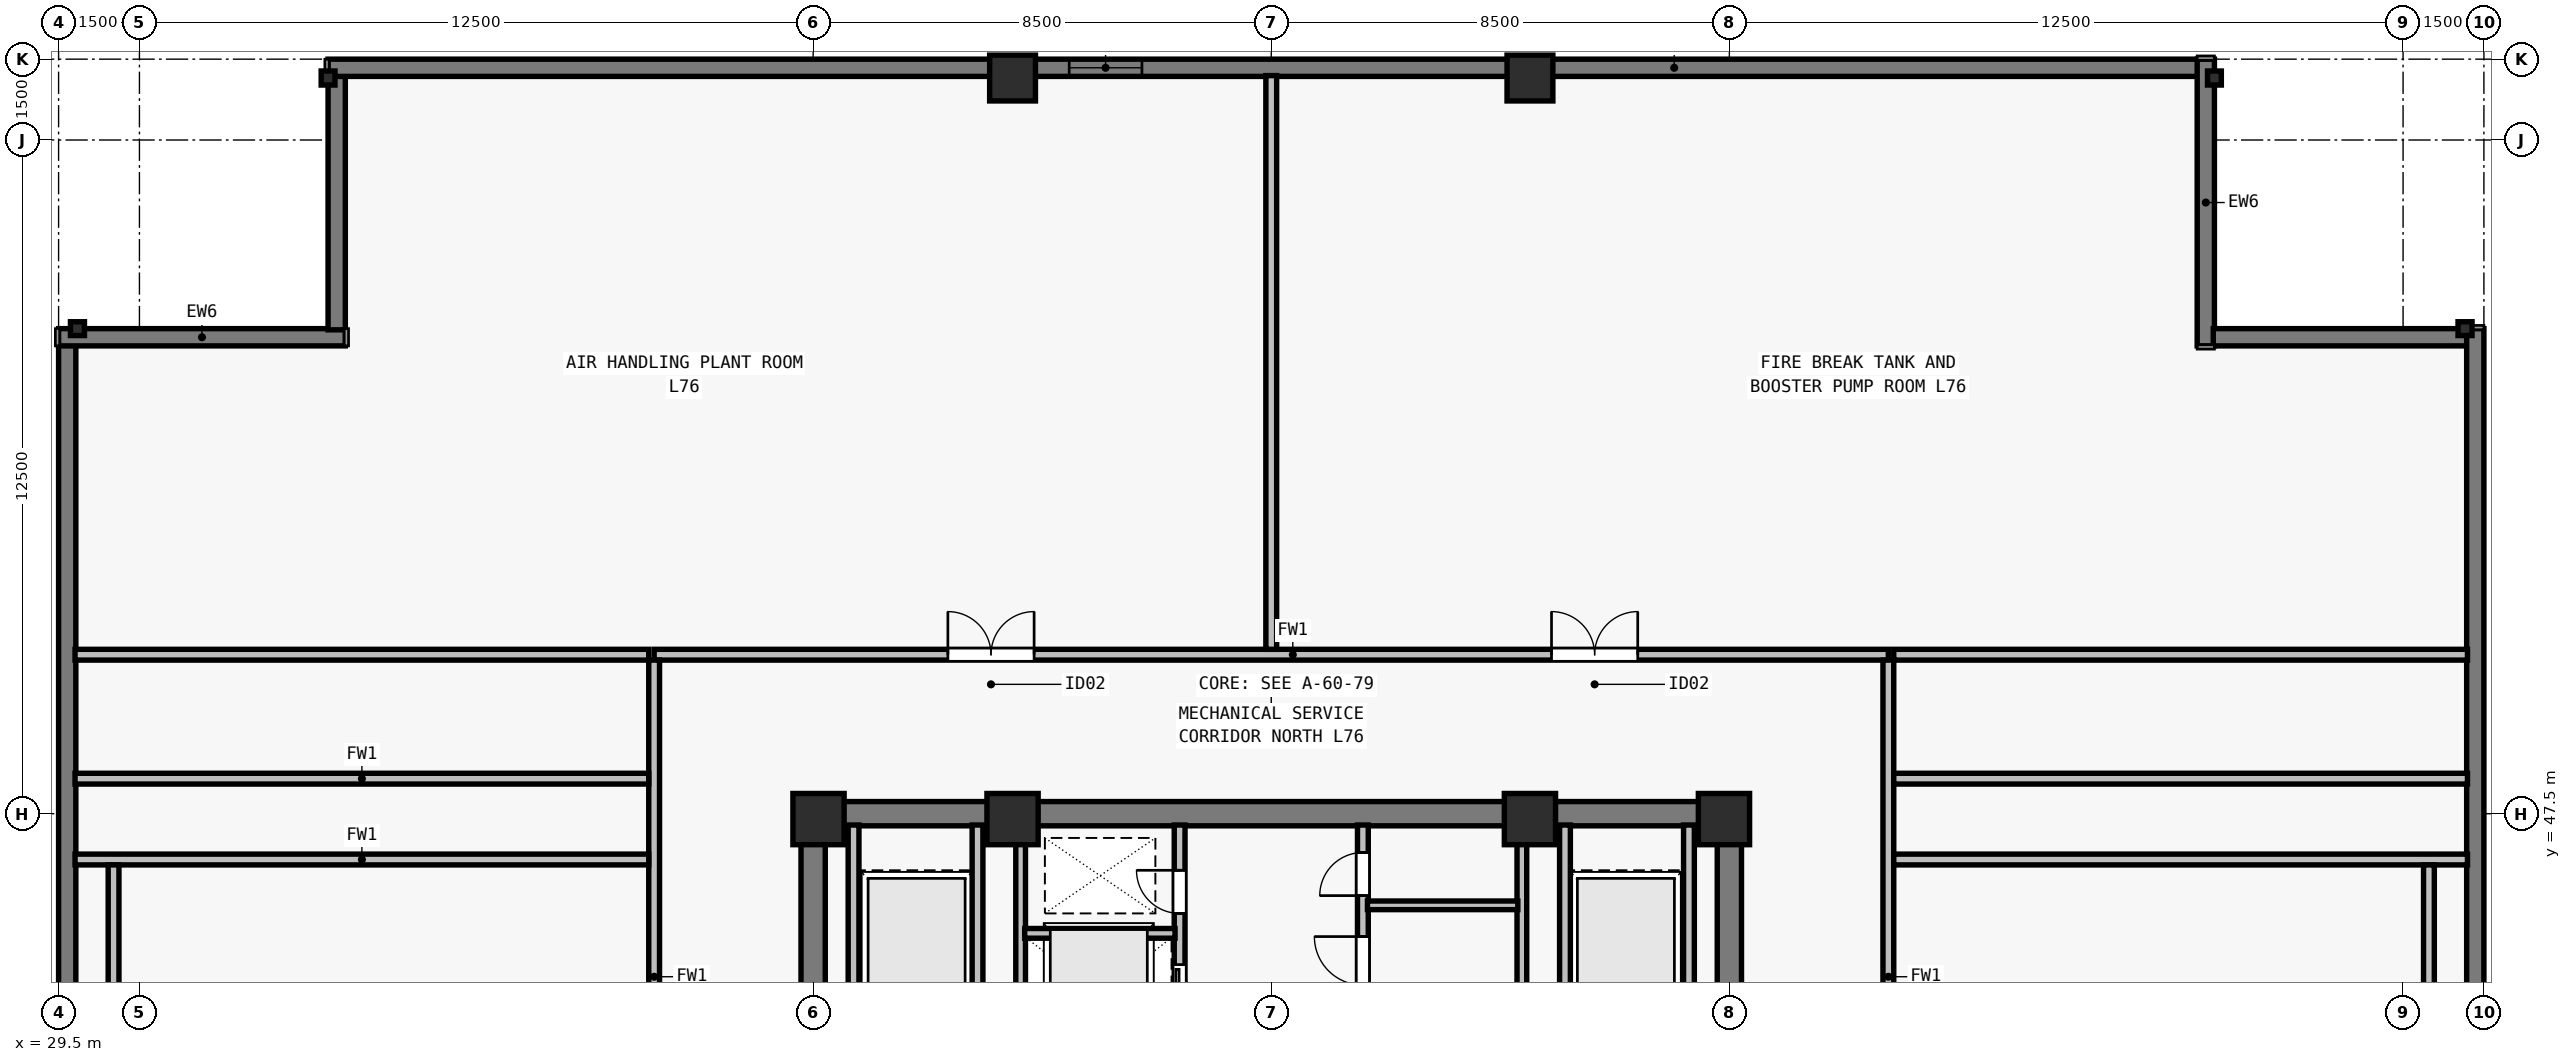
"""IFC4 building model, lengths in metres.
Left out: names, types, materials, properties, quantities, classifications, styles, units other than length and angle.
Written with IfcOpenShell. Run it as: python <this file> out.ifc"""

import sys

from ifc_helpers import new_model, si_unit, direction, frame, frame_2d, origin, origin_2d, place, context, subcontext, project, spatial, rectangle, i_section, extrude, element, fill, save


model = new_model("IFC4")
c1 = context("Model", 3, precision=1e-05, world=origin(), true_north=direction((0.0, 1.0)))
c2 = subcontext(c1, "Body", "Model", "MODEL_VIEW")
j1 = project(units=[si_unit("LENGTHUNIT", "METRE"), si_unit("PLANEANGLEUNIT", "RADIAN")], contexts=[c1])
p1 = place(None, origin())
s1 = spatial("IfcSite", under=j1, at=p1, CompositionType="ELEMENT")
p2 = place(p1, origin())
s2 = spatial("IfcBuilding", under=s1, at=p2, CompositionType="ELEMENT")
p3 = place(p2, frame((0.0, 0.0, 276.0)))
s3 = spatial("IfcBuildingStorey", under=s2, at=p3, CompositionType="ELEMENT", Elevation=276.0)
for number, where, z_axis, x_axis in (
    (1, (43.6, 47.4, 0.0), (0.0, 0.0, 1.0), (1.0, 0.0, 0.0)),
    (2, (47.2, 47.4, 0.0), (0.0, 0.0, 1.0), (1.0, 0.0, 0.0)),
    (3, (56.8, 47.4, 0.0), (0.0, 0.0, 1.0), (1.0, 0.0, 0.0)),
    (4, (60.4, 47.4, 0.0), (0.0, 0.0, 1.0), (1.0, 0.0, 0.0)),
):
    element("IfcColumn", number, at=place(p3, frame(where, z_axis=z_axis, x_axis=x_axis)), inside=s3, PredefinedType="COLUMN", context=c2, shape_type="SweptSolid", body=[
        extrude(rectangle(XDim=0.95, YDim=0.95, at=origin_2d()), origin(), (0.0, 0.0, 1.0), 4.5),
    ])
for number, where, z_axis, x_axis in (
    (5, (74.15, 56.5, 0.0), (0.0, 0.0, 1.0), (0.0, 1.0, 0.0)),
    (6, (69.5, 61.15, 0.0), (0.0, 0.0, 1.0), (1.0, 0.0, 0.0)),
):
    element("IfcColumn", number, at=place(p3, frame(where, z_axis=z_axis, x_axis=x_axis)), inside=s3, PredefinedType="COLUMN", context=c2, shape_type="SweptSolid", body=[
        extrude(i_section(OverallWidth=0.256, OverallDepth=0.26, WebThickness=0.01, FlangeThickness=0.017, FilletRadius=0.013, at=origin_2d()), origin(), (0.0, 0.0, 1.0), 4.5),
    ])
for number, where, z_axis, x_axis in (
    (7, (56.8, 61.15, 0.0), (0.0, 0.0, 1.0), (1.0, 0.0, 0.0)),
    (8, (47.2, 61.15, 0.0), (0.0, 0.0, 1.0), (1.0, 0.0, 0.0)),
):
    element("IfcColumn", number, at=place(p3, frame(where, z_axis=z_axis, x_axis=x_axis)), inside=s3, PredefinedType="COLUMN", context=c2, shape_type="SweptSolid", body=[
        extrude(rectangle(XDim=0.85, YDim=0.85, at=origin_2d()), origin(), (0.0, 0.0, 1.0), 4.5),
    ])
for number, where, z_axis, x_axis in (
    (9, (34.5, 61.15, 0.0), (0.0, 0.0, 1.0), (1.0, 0.0, 0.0)),
    (10, (29.85, 56.5, 0.0), (0.0, 0.0, 1.0), (0.0, 1.0, 0.0)),
):
    element("IfcColumn", number, at=place(p3, frame(where, z_axis=z_axis, x_axis=x_axis)), inside=s3, PredefinedType="COLUMN", context=c2, shape_type="SweptSolid", body=[
        extrude(i_section(OverallWidth=0.256, OverallDepth=0.26, WebThickness=0.01, FlangeThickness=0.017, FilletRadius=0.013, at=origin_2d()), origin(), (0.0, 0.0, 1.0), 4.5),
    ])
p4 = place(p3, frame((29.66, 21.5, 0.0), z_axis=(0.0, 0.0, 1.0), x_axis=(0.0, 1.0, 0.0)))
e11 = element("IfcWall", 11, at=p4, inside=s3, PredefinedType="SOLIDWALL", context=c2, shape_type="SweptSolid", body=[
    extrude(rectangle(XDim=34.702, YDim=0.32, at=frame_2d((17.351, 0.0))), origin(), (0.0, 0.0, 1.0), 4.29),
])
p5 = place(p3, frame((29.5, 56.34, 0.0), z_axis=(0.0, 0.0, 1.0), x_axis=(1.0, 0.0, 0.0)))
e12 = element("IfcWall", 12, at=p5, inside=s3, PredefinedType="SOLIDWALL", context=c2, shape_type="SweptSolid", body=[
    extrude(rectangle(XDim=5.32, YDim=0.32, at=frame_2d((2.66, 0.0))), origin(), (0.0, 0.0, 1.0), 4.29),
])
p6 = place(p3, frame((34.66, 56.478, 0.0), z_axis=(0.0, 0.0, 1.0), x_axis=(0.0, 1.0, 0.0)))
e13 = element("IfcWall", 13, at=p6, inside=s3, PredefinedType="SOLIDWALL", context=c2, shape_type="SweptSolid", body=[
    extrude(rectangle(XDim=4.724, YDim=0.32, at=frame_2d((2.362, 0.0))), origin(), (0.0, 0.0, 1.0), 4.29),
])
p7 = place(p3, frame((34.5, 61.34, 0.0), z_axis=(0.0, 0.0, 1.0), x_axis=(1.0, 0.0, 0.0)))
e14 = element("IfcWall", 14, at=p7, inside=s3, PredefinedType="SOLIDWALL", context=c2, shape_type="SweptSolid", body=[
    extrude(rectangle(XDim=34.702, YDim=0.32, at=frame_2d((17.351, 0.0))), origin(), (0.0, 0.0, 1.0), 4.29),
])
p8 = place(p7, frame((13.751, 0.0, 0.8)))
e15 = element("IfcOpeningElement", 15, at=p8, cuts=e14, PredefinedType="OPENING", context=c2, shape_type="SweptSolid", body=[
    extrude(rectangle(XDim=1.35, YDim=1.54, at=frame_2d((0.675, 0.77))), frame((0.0, 0.17, 0.0), z_axis=(0.0, -1.0, 0.0), x_axis=(1.0, 0.0, 0.0)), (0.0, 0.0, 1.0), 0.34),
])
p9 = place(p3, frame((69.34, 61.5, 0.0), z_axis=(0.0, 0.0, 1.0), x_axis=(0.0, -1.0, 0.0)))
e16 = element("IfcWall", 16, at=p9, inside=s3, PredefinedType="SOLIDWALL", context=c2, shape_type="SweptSolid", body=[
    extrude(rectangle(XDim=5.32, YDim=0.32, at=frame_2d((2.66, 0.0))), origin(), (0.0, 0.0, 1.0), 4.29),
])
p10 = place(p3, frame((69.478, 56.34, 0.0), z_axis=(0.0, 0.0, 1.0), x_axis=(1.0, 0.0, 0.0)))
e17 = element("IfcWall", 17, at=p10, inside=s3, PredefinedType="SOLIDWALL", context=c2, shape_type="SweptSolid", body=[
    extrude(rectangle(XDim=4.724, YDim=0.32, at=frame_2d((2.362, 0.0))), origin(), (0.0, 0.0, 1.0), 4.29),
])
p11 = place(p3, frame((74.34, 56.5, 0.0), z_axis=(0.0, 0.0, 1.0), x_axis=(0.0, -1.0, 0.0)))
e18 = element("IfcWall", 18, at=p11, inside=s3, PredefinedType="SOLIDWALL", context=c2, shape_type="SweptSolid", body=[
    extrude(rectangle(XDim=34.702, YDim=0.32, at=frame_2d((17.351, 0.0))), origin(), (0.0, 0.0, 1.0), 4.29),
])
p12 = place(p3, frame((43.275, 47.5, 0.0), z_axis=(0.0, 0.0, 1.0), x_axis=(1.0, 0.0, 0.0)))
e19 = element("IfcWall", 19, at=p12, inside=s3, PredefinedType="SHEAR", context=c2, shape_type="SweptSolid", body=[
    extrude(rectangle(XDim=17.45, YDim=0.45, at=frame_2d((8.725, 0.0))), origin(), (0.0, 0.0, 1.0), 4.29),
])
for number, where, z_axis, x_axis in (
    (20, (43.5, 40.8, 0.0), (0.0, 0.0, 1.0), (0.0, 1.0, 0.0)),
    (21, (60.5, 40.8, 0.0), (0.0, 0.0, 1.0), (0.0, 1.0, 0.0)),
):
    element("IfcWall", number, at=place(p3, frame(where, z_axis=z_axis, x_axis=x_axis)), inside=s3, PredefinedType="SHEAR", context=c2, shape_type="SweptSolid", body=[
        extrude(rectangle(XDim=6.485, YDim=0.45, at=frame_2d((3.242, 0.0))), origin(), (0.0, 0.0, 1.0), 4.29),
    ])
p13 = place(p3, frame((50.3, 40.585, 0.0), z_axis=(0.0, 0.0, 1.0), x_axis=(0.0, 1.0, 0.0)))
e22 = element("IfcWall", 22, at=p13, inside=s3, PredefinedType="SOLIDWALL", context=c2, shape_type="SweptSolid", body=[
    extrude(rectangle(XDim=6.705, YDim=0.2, at=frame_2d((3.353, 0.0))), origin(), (0.0, 0.0, 1.0), 4.29),
])
p14 = place(p13, frame((0.515, 0.0, 0.0)))
e23 = element("IfcOpeningElement", 23, at=p14, cuts=e22, PredefinedType="OPENING", context=c2, shape_type="SweptSolid", body=[
    extrude(rectangle(XDim=1.1, YDim=2.2, at=frame_2d((0.55, 1.1))), frame((0.0, 0.11, 0.0), z_axis=(0.0, -1.0, 0.0), x_axis=(1.0, 0.0, 0.0)), (0.0, 0.0, 1.0), 0.22),
])
p15 = place(p13, frame((3.015, 0.0, 0.0)))
e24 = element("IfcOpeningElement", 24, at=p15, cuts=e22, PredefinedType="OPENING", context=c2, shape_type="SweptSolid", body=[
    extrude(rectangle(XDim=1.1, YDim=2.2, at=frame_2d((0.55, 1.1))), frame((0.0, 0.11, 0.0), z_axis=(0.0, -1.0, 0.0), x_axis=(1.0, 0.0, 0.0)), (0.0, 0.0, 1.0), 0.22),
])
p16 = place(p13, frame((5.065, 0.0, 0.0)))
e25 = element("IfcOpeningElement", 25, at=p16, cuts=e22, PredefinedType="OPENING", context=c2, shape_type="SweptSolid", body=[
    extrude(rectangle(XDim=0.8, YDim=2.08, at=frame_2d((0.4, 1.04))), frame((0.0, 0.11, 0.0), z_axis=(0.0, -1.0, 0.0), x_axis=(1.0, 0.0, 0.0)), (0.0, 0.0, 1.0), 0.22),
])
p17 = place(p3, frame((53.7, 40.585, 0.0), z_axis=(0.0, 0.0, 1.0), x_axis=(0.0, 1.0, 0.0)))
e26 = element("IfcWall", 26, at=p17, inside=s3, PredefinedType="SOLIDWALL", context=c2, shape_type="SweptSolid", body=[
    extrude(rectangle(XDim=6.705, YDim=0.2, at=frame_2d((3.353, 0.0))), origin(), (0.0, 0.0, 1.0), 4.29),
])
p18 = place(p17, frame((0.195, 0.0, 0.0)))
e27 = element("IfcOpeningElement", 27, at=p18, cuts=e26, PredefinedType="OPENING", context=c2, shape_type="SweptSolid", body=[
    extrude(rectangle(XDim=0.8, YDim=2.08, at=frame_2d((0.4, 1.04))), frame((0.0, 0.11, 0.0), z_axis=(0.0, -1.0, 0.0), x_axis=(1.0, 0.0, 0.0)), (0.0, 0.0, 1.0), 0.22),
])
p19 = place(p17, frame((3.735, 0.0, 0.0)))
e28 = element("IfcOpeningElement", 28, at=p19, cuts=e26, PredefinedType="OPENING", context=c2, shape_type="SweptSolid", body=[
    extrude(rectangle(XDim=0.9, YDim=2.12, at=frame_2d((0.45, 1.06))), frame((0.0, 0.11, 0.0), z_axis=(0.0, -1.0, 0.0), x_axis=(1.0, 0.0, 0.0)), (0.0, 0.0, 1.0), 0.22),
])
p20 = place(p17, frame((5.395, 0.0, 0.0)))
e29 = element("IfcOpeningElement", 29, at=p20, cuts=e26, PredefinedType="OPENING", context=c2, shape_type="SweptSolid", body=[
    extrude(rectangle(XDim=0.8, YDim=2.1, at=frame_2d((0.4, 1.05))), frame((0.0, 0.11, 0.0), z_axis=(0.0, -1.0, 0.0), x_axis=(1.0, 0.0, 0.0)), (0.0, 0.0, 1.0), 0.22),
])
for number, where, z_axis, x_axis in (
    (30, (46.55, 43.735, 0.0), (0.0, 0.0, 1.0), (0.0, 1.0, 0.0)),
    (31, (44.25, 43.735, 0.0), (0.0, 0.0, 1.0), (0.0, 1.0, 0.0)),
    (32, (57.45, 43.735, 0.0), (0.0, 0.0, 1.0), (0.0, 1.0, 0.0)),
    (33, (59.75, 43.735, 0.0), (0.0, 0.0, 1.0), (0.0, 1.0, 0.0)),
):
    element("IfcWall", number, at=place(p3, frame(where, z_axis=z_axis, x_axis=x_axis)), inside=s3, PredefinedType="SOLIDWALL", context=c2, shape_type="SweptSolid", body=[
        extrude(rectangle(XDim=3.555, YDim=0.2, at=frame_2d((1.777, 0.0))), origin(), (0.0, 0.0, 1.0), 4.29),
    ])
p21 = place(p3, frame((47.35, 43.735, 0.0), z_axis=(0.0, 0.0, 1.0), x_axis=(0.0, 1.0, 0.0)))
e34 = element("IfcWall", 34, at=p21, inside=s3, PredefinedType="SOLIDWALL", context=c2, shape_type="SweptSolid", body=[
    extrude(rectangle(XDim=3.555, YDim=0.18, at=frame_2d((1.777, 0.0))), origin(), (0.0, 0.0, 1.0), 4.29),
])
p22 = place(p3, frame((47.425, 45.28, 0.0), z_axis=(0.0, 0.0, 1.0), x_axis=(1.0, 0.0, 0.0)))
e35 = element("IfcWall", 35, at=p22, inside=s3, PredefinedType="SOLIDWALL", context=c2, shape_type="SweptSolid", body=[
    extrude(rectangle(XDim=2.79, YDim=0.18, at=frame_2d((1.395, 0.0))), origin(), (0.0, 0.0, 1.0), 4.29),
])
p23 = place(p3, frame((56.65, 43.735, 0.0), z_axis=(0.0, 0.0, 1.0), x_axis=(0.0, 1.0, 0.0)))
e36 = element("IfcWall", 36, at=p23, inside=s3, PredefinedType="SOLIDWALL", context=c2, shape_type="SweptSolid", body=[
    extrude(rectangle(XDim=3.555, YDim=0.18, at=frame_2d((1.777, 0.0))), origin(), (0.0, 0.0, 1.0), 4.29),
])
p24 = place(p3, frame((53.785, 45.8, 0.0), z_axis=(0.0, 0.0, 1.0), x_axis=(1.0, 0.0, 0.0)))
e37 = element("IfcWall", 37, at=p24, inside=s3, PredefinedType="PARTITIONING", context=c2, shape_type="SweptSolid", body=[
    extrude(rectangle(XDim=2.79, YDim=0.16, at=frame_2d((1.395, 0.0))), origin(), (0.0, 0.0, 1.0), 4.29),
])
p25 = place(p3, frame((40.55, 50.45, 0.0), z_axis=(0.0, 0.0, 1.0), x_axis=(1.0, 0.0, 0.0)))
e38 = element("IfcWall", 38, at=p25, inside=s3, PredefinedType="SOLIDWALL", context=c2, shape_type="SweptSolid", body=[
    extrude(rectangle(XDim=22.9, YDim=0.2, at=frame_2d((11.45, 0.0))), origin(), (0.0, 0.0, 1.0), 4.29),
])
p26 = place(p25, frame((5.45, 0.0, 0.0)))
e39 = element("IfcOpeningElement", 39, at=p26, cuts=e38, PredefinedType="OPENING", context=c2, shape_type="SweptSolid", body=[
    extrude(rectangle(XDim=1.6, YDim=2.2, at=frame_2d((0.8, 1.1))), frame((0.0, 0.11, 0.0), z_axis=(0.0, -1.0, 0.0), x_axis=(1.0, 0.0, 0.0)), (0.0, 0.0, 1.0), 0.22),
])
p27 = place(p25, frame((16.65, 0.0, 0.0)))
e40 = element("IfcOpeningElement", 40, at=p27, cuts=e38, PredefinedType="OPENING", context=c2, shape_type="SweptSolid", body=[
    extrude(rectangle(XDim=1.6, YDim=2.2, at=frame_2d((0.8, 1.1))), frame((0.0, 0.11, 0.0), z_axis=(0.0, -1.0, 0.0), x_axis=(1.0, 0.0, 0.0)), (0.0, 0.0, 1.0), 0.22),
])
p28 = place(p3, frame((40.55, 27.65, 0.0), z_axis=(0.0, 0.0, 1.0), x_axis=(0.0, 1.0, 0.0)))
e41 = element("IfcWall", 41, at=p28, inside=s3, PredefinedType="SOLIDWALL", context=c2, shape_type="SweptSolid", body=[
    extrude(rectangle(XDim=22.7, YDim=0.2, at=frame_2d((11.35, 0.0))), origin(), (0.0, 0.0, 1.0), 4.29),
])
p29 = place(p28, frame((9.2, 0.0, 0.0)))
e42 = element("IfcOpeningElement", 42, at=p29, cuts=e41, PredefinedType="OPENING", context=c2, shape_type="SweptSolid", body=[
    extrude(rectangle(XDim=1.6, YDim=2.2, at=frame_2d((0.8, 1.1))), frame((0.0, 0.11, 0.0), z_axis=(0.0, -1.0, 0.0), x_axis=(1.0, 0.0, 0.0)), (0.0, 0.0, 1.0), 0.22),
])
p30 = place(p3, frame((63.45, 27.65, 0.0), z_axis=(0.0, 0.0, 1.0), x_axis=(0.0, 1.0, 0.0)))
e43 = element("IfcWall", 43, at=p30, inside=s3, PredefinedType="SOLIDWALL", context=c2, shape_type="SweptSolid", body=[
    extrude(rectangle(XDim=22.7, YDim=0.2, at=frame_2d((11.35, 0.0))), origin(), (0.0, 0.0, 1.0), 4.29),
])
p31 = place(p30, frame((9.2, 0.0, 0.0)))
e44 = element("IfcOpeningElement", 44, at=p31, cuts=e43, PredefinedType="OPENING", context=c2, shape_type="SweptSolid", body=[
    extrude(rectangle(XDim=1.6, YDim=2.2, at=frame_2d((0.8, 1.1))), frame((0.0, 0.11, 0.0), z_axis=(0.0, -1.0, 0.0), x_axis=(1.0, 0.0, 0.0)), (0.0, 0.0, 1.0), 0.22),
])
for number, where, z_axis, x_axis in (
    (45, (29.805, 46.65, 0.0), (0.0, 0.0, 1.0), (1.0, 0.0, 0.0)),
    (46, (63.55, 46.65, 0.0), (0.0, 0.0, 1.0), (1.0, 0.0, 0.0)),
):
    element("IfcWall", number, at=place(p3, frame(where, z_axis=z_axis, x_axis=x_axis)), inside=s3, PredefinedType="SOLIDWALL", context=c2, shape_type="SweptSolid", body=[
        extrude(rectangle(XDim=10.645, YDim=0.2, at=frame_2d((5.323, 0.0))), origin(), (0.0, 0.0, 1.0), 2.465),
    ])
for number, where, z_axis, x_axis in (
    (47, (29.805, 48.15, 0.0), (0.0, 0.0, 1.0), (1.0, 0.0, 0.0)),
    (48, (63.55, 48.15, 0.0), (0.0, 0.0, 1.0), (1.0, 0.0, 0.0)),
):
    element("IfcWall", number, at=place(p3, frame(where, z_axis=z_axis, x_axis=x_axis)), inside=s3, PredefinedType="SOLIDWALL", context=c2, shape_type="SweptSolid", body=[
        extrude(rectangle(XDim=10.645, YDim=0.2, at=frame_2d((5.323, 0.0))), origin(), (0.0, 0.0, 1.0), 4.29),
    ])
for number, where, z_axis, x_axis in (
    (49, (30.52, 31.45, 0.0), (0.0, 0.0, 1.0), (0.0, 1.0, 0.0)),
    (50, (73.48, 31.45, 0.0), (0.0, 0.0, 1.0), (0.0, 1.0, 0.0)),
):
    element("IfcWall", number, at=place(p3, frame(where, z_axis=z_axis, x_axis=x_axis)), inside=s3, PredefinedType="SOLIDWALL", context=c2, shape_type="SweptSolid", body=[
        extrude(rectangle(XDim=15.1, YDim=0.2, at=frame_2d((7.55, 0.0))), origin(), (0.0, 0.0, 1.0), 4.29),
    ])
for number, where, z_axis, x_axis in (
    (51, (52.0, 50.55, 0.0), (0.0, 0.0, 1.0), (0.0, 1.0, 0.0)),
    (52, (29.805, 50.45, 0.0), (0.0, 0.0, 1.0), (1.0, 0.0, 0.0)),
    (53, (63.55, 50.45, 0.0), (0.0, 0.0, 1.0), (1.0, 0.0, 0.0)),
):
    element("IfcWall", number, at=place(p3, frame(where, z_axis=z_axis, x_axis=x_axis)), inside=s3, PredefinedType="SOLIDWALL", context=c2, shape_type="SweptSolid", body=[
        extrude(rectangle(XDim=10.645, YDim=0.2, at=frame_2d((5.323, 0.0))), origin(), (0.0, 0.0, 1.0), 3.958),
    ])
p32 = place(p8, origin())
e54 = element("IfcWindow", 54, at=p32, inside=s3, PartitioningType="SINGLE_PANEL", PredefinedType="WINDOW", context=c2, shape_type="SweptSolid", body=[
    extrude(rectangle(XDim=1.35, YDim=1.54, at=frame_2d((0.675, 0.77))), frame((0.0, -0.04, 0.0), z_axis=(0.0, -1.0, 0.0), x_axis=(1.0, 0.0, 0.0)), (0.0, 0.0, 1.0), 0.06),
])
fill(e15, e54)
p33 = place(p15, origin())
e55 = element("IfcDoor", 55, at=p33, inside=s3, OperationType="SLIDING_TO_LEFT", PredefinedType="DOOR", context=c2, shape_type="SweptSolid", body=[
    extrude(rectangle(XDim=1.1, YDim=2.2, at=frame_2d((0.55, 1.1))), frame((0.0, 0.025, 0.0), z_axis=(0.0, -1.0, 0.0), x_axis=(1.0, 0.0, 0.0)), (0.0, 0.0, 1.0), 0.05),
])
fill(e24, e55)
p34 = place(p16, origin())
e56 = element("IfcDoor", 56, at=p34, inside=s3, OperationType="SINGLE_SWING_RIGHT", PredefinedType="DOOR", context=c2, shape_type="SweptSolid", body=[
    extrude(rectangle(XDim=0.8, YDim=2.08, at=frame_2d((0.4, 1.04))), frame((0.0, 0.025, 0.0), z_axis=(0.0, -1.0, 0.0), x_axis=(1.0, 0.0, 0.0)), (0.0, 0.0, 1.0), 0.05),
])
fill(e25, e56)
p35 = place(p19, origin())
e57 = element("IfcDoor", 57, at=p35, inside=s3, OperationType="SINGLE_SWING_RIGHT", PredefinedType="DOOR", context=c2, shape_type="SweptSolid", body=[
    extrude(rectangle(XDim=0.9, YDim=2.12, at=frame_2d((0.45, 1.06))), frame((0.0, 0.025, 0.0), z_axis=(0.0, -1.0, 0.0), x_axis=(1.0, 0.0, 0.0)), (0.0, 0.0, 1.0), 0.05),
])
fill(e28, e57)
p36 = place(p20, origin())
e58 = element("IfcDoor", 58, at=p36, inside=s3, OperationType="SINGLE_SWING_LEFT", PredefinedType="DOOR", context=c2, shape_type="SweptSolid", body=[
    extrude(rectangle(XDim=0.8, YDim=2.1, at=frame_2d((0.4, 1.05))), frame((0.0, 0.025, 0.0), z_axis=(0.0, -1.0, 0.0), x_axis=(1.0, 0.0, 0.0)), (0.0, 0.0, 1.0), 0.05),
])
fill(e29, e58)
p37 = place(p26, origin())
e59 = element("IfcDoor", 59, at=p37, inside=s3, OperationType="DOUBLE_DOOR_SINGLE_SWING", PredefinedType="DOOR", context=c2, shape_type="SweptSolid", body=[
    extrude(rectangle(XDim=1.6, YDim=2.2, at=frame_2d((0.8, 1.1))), frame((0.0, 0.025, 0.0), z_axis=(0.0, -1.0, 0.0), x_axis=(1.0, 0.0, 0.0)), (0.0, 0.0, 1.0), 0.05),
])
fill(e39, e59)
p38 = place(p27, origin())
e60 = element("IfcDoor", 60, at=p38, inside=s3, OperationType="DOUBLE_DOOR_SINGLE_SWING", PredefinedType="DOOR", context=c2, shape_type="SweptSolid", body=[
    extrude(rectangle(XDim=1.6, YDim=2.2, at=frame_2d((0.8, 1.1))), frame((0.0, 0.025, 0.0), z_axis=(0.0, -1.0, 0.0), x_axis=(1.0, 0.0, 0.0)), (0.0, 0.0, 1.0), 0.05),
])
fill(e40, e60)
save(model, sys.argv[1])
